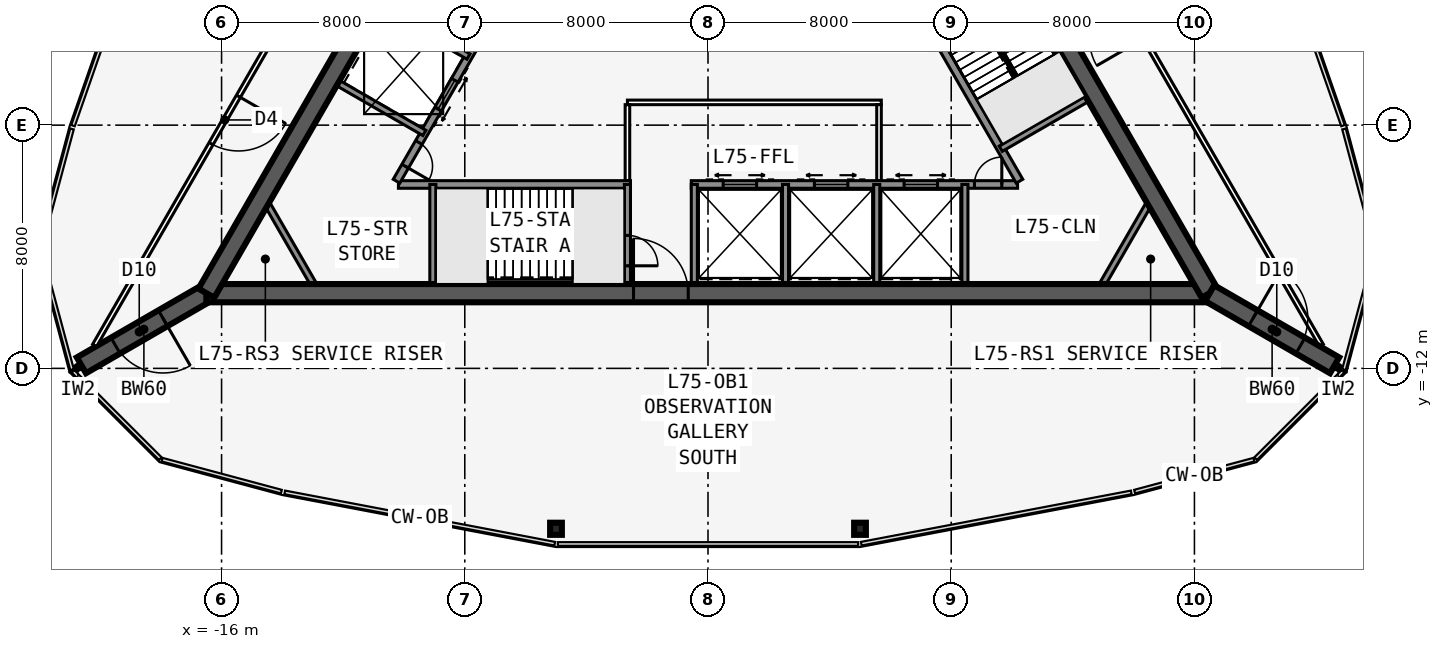
"""IFC4 building model, lengths in metres.
Left out: names, types, materials, properties, quantities, classifications, styles, units other than length and angle.
Written with IfcOpenShell. Run it as: python <this file> out.ifc"""

import sys

from ifc_helpers import new_model, si_unit, direction, frame, frame_2d, origin, origin_2d, place, context, subcontext, project, spatial, rectangle, i_section, extrude, element, fill, save


model = new_model("IFC4")
c1 = context("Model", 3, precision=1e-05, world=origin(), true_north=direction((0.0, 1.0)))
c2 = subcontext(c1, "Body", "Model", "MODEL_VIEW")
j1 = project(units=[si_unit("LENGTHUNIT", "METRE"), si_unit("PLANEANGLEUNIT", "RADIAN")], contexts=[c1])
p1 = place(None, origin())
s1 = spatial("IfcSite", under=j1, at=p1, CompositionType="ELEMENT")
p2 = place(p1, origin())
s2 = spatial("IfcBuilding", under=s1, at=p2, CompositionType="ELEMENT")
p3 = place(p2, frame((0.0, 0.0, 286.8)))
s3 = spatial("IfcBuildingStorey", under=s2, at=p3, CompositionType="ELEMENT", Elevation=286.8)
p4 = place(p3, frame((-16.5, -9.526, 0.0), z_axis=(0.0, 0.0, 1.0), x_axis=(1.0, 0.0, 0.0)))
e1 = element("IfcWall", 1, at=p4, inside=s3, PredefinedType="SHEAR", context=c2, shape_type="SweptSolid", body=[
    extrude(rectangle(XDim=33.0, YDim=0.6, at=frame_2d((16.5, 0.0))), origin(), (0.0, 0.0, 1.0), 6.0),
])
p5 = place(p4, frame((14.05, 0.0, 0.0)))
e2 = element("IfcOpeningElement", 2, at=p5, cuts=e1, PredefinedType="OPENING", context=c2, shape_type="SweptSolid", body=[
    extrude(rectangle(XDim=1.8, YDim=2.13, at=frame_2d((0.9, 1.065))), frame((0.0, 0.31, 0.0), z_axis=(0.0, -1.0, 0.0), x_axis=(1.0, 0.0, 0.0)), (0.0, 0.0, 1.0), 0.62),
])
p6 = place(p3, frame((-10.183, -5.951, 0.0), z_axis=(0.0, 0.0, 1.0), x_axis=(1.0, 0.0, 0.0)))
e3 = element("IfcWall", 3, at=p6, inside=s3, PredefinedType="SOLIDWALL", context=c2, shape_type="SweptSolid", body=[
    extrude(rectangle(XDim=7.633, YDim=0.25, at=frame_2d((3.816, 0.0))), origin(), (0.0, 0.0, 1.0), 5.75),
])
p7 = place(p3, frame((-0.55, -5.951, 0.0), z_axis=(0.0, 0.0, 1.0), x_axis=(1.0, 0.0, 0.0)))
e4 = element("IfcWall", 4, at=p7, inside=s3, PredefinedType="SOLIDWALL", context=c2, shape_type="SweptSolid", body=[
    extrude(rectangle(XDim=10.733, YDim=0.25, at=frame_2d((5.366, 0.0))), origin(), (0.0, 0.0, 1.0), 5.75),
])
p8 = place(p7, frame((9.314, 0.0, 0.0)))
e5 = element("IfcOpeningElement", 5, at=p8, cuts=e4, PredefinedType="OPENING", context=c2, shape_type="SweptSolid", body=[
    extrude(rectangle(XDim=0.9, YDim=2.13, at=frame_2d((0.45, 1.065))), frame((0.0, 0.135, 0.0), z_axis=(0.0, -1.0, 0.0), x_axis=(1.0, 0.0, 0.0)), (0.0, 0.0, 1.0), 0.27),
])
p9 = place(p7, frame((1.05, 0.0, 0.0)))
e6 = element("IfcOpeningElement", 6, at=p9, cuts=e4, PredefinedType="OPENING", context=c2, shape_type="SweptSolid", body=[
    extrude(rectangle(XDim=1.1, YDim=2.13, at=frame_2d((0.55, 1.065))), frame((0.0, 0.135, 0.0), z_axis=(0.0, -1.0, 0.0), x_axis=(1.0, 0.0, 0.0)), (0.0, 0.0, 1.0), 0.27),
])
p10 = place(p7, frame((4.05, 0.0, 0.0)))
e7 = element("IfcOpeningElement", 7, at=p10, cuts=e4, PredefinedType="OPENING", context=c2, shape_type="SweptSolid", body=[
    extrude(rectangle(XDim=1.1, YDim=2.13, at=frame_2d((0.55, 1.065))), frame((0.0, 0.135, 0.0), z_axis=(0.0, -1.0, 0.0), x_axis=(1.0, 0.0, 0.0)), (0.0, 0.0, 1.0), 0.27),
])
p11 = place(p7, frame((7.0, 0.0, 0.0)))
e8 = element("IfcOpeningElement", 8, at=p11, cuts=e4, PredefinedType="OPENING", context=c2, shape_type="SweptSolid", body=[
    extrude(rectangle(XDim=1.1, YDim=2.13, at=frame_2d((0.55, 1.065))), frame((0.0, 0.135, 0.0), z_axis=(0.0, -1.0, 0.0), x_axis=(1.0, 0.0, 0.0)), (0.0, 0.0, 1.0), 0.27),
])
p12 = place(p3, frame((-9.05, -5.951, 0.0), z_axis=(0.0, 0.0, 1.0), x_axis=(0.0, -1.0, 0.0)))
e9 = element("IfcWall", 9, at=p12, inside=s3, PredefinedType="SOLIDWALL", context=c2, shape_type="SweptSolid", body=[
    extrude(rectangle(XDim=3.275, YDim=0.2, at=frame_2d((1.637, 0.0))), origin(), (0.0, 0.0, 1.0), 5.75),
])
p13 = place(p3, frame((-2.65, -5.951, 0.0), z_axis=(0.0, 0.0, 1.0), x_axis=(0.0, -1.0, 0.0)))
e10 = element("IfcWall", 10, at=p13, inside=s3, PredefinedType="SOLIDWALL", context=c2, shape_type="SweptSolid", body=[
    extrude(rectangle(XDim=3.275, YDim=0.2, at=frame_2d((1.637, 0.0))), origin(), (0.0, 0.0, 1.0), 5.75),
])
p14 = place(p13, frame((1.675, 0.0, 0.0)))
e11 = element("IfcOpeningElement", 11, at=p14, cuts=e10, PredefinedType="OPENING", context=c2, shape_type="SweptSolid", body=[
    extrude(rectangle(XDim=1.0, YDim=2.13, at=frame_2d((0.5, 1.065))), frame((0.0, 0.11, 0.0), z_axis=(0.0, -1.0, 0.0), x_axis=(1.0, 0.0, 0.0)), (0.0, 0.0, 1.0), 0.22),
])
for number, where, z_axis, x_axis in (
    (12, (-0.45, -5.951, 0.0), (0.0, 0.0, 1.0), (0.0, -1.0, 0.0)),
    (13, (2.55, -5.951, 0.0), (0.0, 0.0, 1.0), (0.0, -1.0, 0.0)),
    (14, (5.55, -5.951, 0.0), (0.0, 0.0, 1.0), (0.0, -1.0, 0.0)),
    (15, (8.45, -5.951, 0.0), (0.0, 0.0, 1.0), (0.0, -1.0, 0.0)),
):
    element("IfcWall", number, at=place(p3, frame(where, z_axis=z_axis, x_axis=x_axis)), inside=s3, PredefinedType="SOLIDWALL", context=c2, shape_type="SweptSolid", body=[
        extrude(rectangle(XDim=3.275, YDim=0.2, at=frame_2d((1.637, 0.0))), origin(), (0.0, 0.0, 1.0), 5.75),
    ])
p15 = place(p3, frame((16.5, -9.526, 0.0), z_axis=(0.0, 0.0, 1.0), x_axis=(-0.499999749417, 0.866025548458, 0.0)))
e16 = element("IfcWall", 16, at=p15, inside=s3, PredefinedType="SHEAR", context=c2, shape_type="SweptSolid", body=[
    extrude(rectangle(XDim=33.0, YDim=0.6, at=frame_2d((16.5, 0.0))), origin(), (0.0, 0.0, 1.0), 6.0),
])
p16 = place(p15, frame((14.15, 0.0, 0.0)))
e17 = element("IfcOpeningElement", 17, at=p16, cuts=e16, PredefinedType="OPENING", context=c2, shape_type="SweptSolid", body=[
    extrude(rectangle(XDim=1.8, YDim=2.13, at=frame_2d((0.9, 1.065))), frame((0.0, 0.31, 0.0), z_axis=(0.0, -1.0, 0.0), x_axis=(1.0, 0.0, 0.0)), (0.0, 0.0, 1.0), 0.62),
])
p17 = place(p15, frame((12.6, 0.0, 0.0)))
e18 = element("IfcOpeningElement", 18, at=p17, cuts=e16, PredefinedType="OPENING", context=c2, shape_type="SweptSolid", body=[
    extrude(rectangle(XDim=1.0, YDim=2.13, at=frame_2d((0.5, 1.065))), frame((0.0, 0.31, 0.0), z_axis=(0.0, -1.0, 0.0), x_axis=(1.0, 0.0, 0.0)), (0.0, 0.0, 1.0), 0.62),
])
p18 = place(p3, frame((10.245, -5.843, 0.0), z_axis=(0.0, 0.0, 1.0), x_axis=(-0.499993009313, 0.866029439822, 0.0)))
e19 = element("IfcWall", 19, at=p18, inside=s3, PredefinedType="SOLIDWALL", context=c2, shape_type="SweptSolid", body=[
    extrude(rectangle(XDim=7.733, YDim=0.25, at=frame_2d((3.866, 0.0))), origin(), (0.0, 0.0, 1.0), 5.75),
])
p19 = place(p3, frame((9.629, -4.775, 0.0), z_axis=(0.0, 0.0, 1.0), x_axis=(0.865995643347, 0.500051543047, 0.0)))
e20 = element("IfcWall", 20, at=p19, inside=s3, PredefinedType="SOLIDWALL", context=c2, shape_type="SweptSolid", body=[
    extrude(rectangle(XDim=3.275, YDim=0.2, at=frame_2d((1.638, 0.0))), origin(), (0.0, 0.0, 1.0), 5.75),
])
p20 = place(p3, frame((0.0, 19.052, 0.0), z_axis=(0.0, 0.0, 1.0), x_axis=(-0.499999749417, -0.866025548458, 0.0)))
e21 = element("IfcWall", 21, at=p20, inside=s3, PredefinedType="SHEAR", context=c2, shape_type="SweptSolid", body=[
    extrude(rectangle(XDim=33.0, YDim=0.6, at=frame_2d((16.5, 0.0))), origin(), (0.0, 0.0, 1.0), 6.0),
])
p21 = place(p20, frame((14.15, 0.0, 0.0)))
e22 = element("IfcOpeningElement", 22, at=p21, cuts=e21, PredefinedType="OPENING", context=c2, shape_type="SweptSolid", body=[
    extrude(rectangle(XDim=1.8, YDim=2.13, at=frame_2d((0.9, 1.065))), frame((0.0, 0.31, 0.0), z_axis=(0.0, -1.0, 0.0), x_axis=(1.0, 0.0, 0.0)), (0.0, 0.0, 1.0), 0.62),
])
p22 = place(p20, frame((12.6, 0.0, 0.0)))
e23 = element("IfcOpeningElement", 23, at=p22, cuts=e21, PredefinedType="OPENING", context=c2, shape_type="SweptSolid", body=[
    extrude(rectangle(XDim=1.0, YDim=2.13, at=frame_2d((0.5, 1.065))), frame((0.0, 0.31, 0.0), z_axis=(0.0, -1.0, 0.0), x_axis=(1.0, 0.0, 0.0)), (0.0, 0.0, 1.0), 0.62),
])
p23 = place(p3, frame((-4.929, 3.365, 0.0), z_axis=(0.0, 0.0, 1.0), x_axis=(-0.499991433582, -0.866030349552, 0.0)))
e24 = element("IfcWall", 24, at=p23, inside=s3, PredefinedType="SOLIDWALL", context=c2, shape_type="SweptSolid", body=[
    extrude(rectangle(XDim=10.633, YDim=0.25, at=frame_2d((5.316, 0.0))), origin(), (0.0, 0.0, 1.0), 5.75),
])
p24 = place(p23, frame((9.164, 0.0, 0.0)))
e25 = element("IfcOpeningElement", 25, at=p24, cuts=e24, PredefinedType="OPENING", context=c2, shape_type="SweptSolid", body=[
    extrude(rectangle(XDim=0.9, YDim=2.13, at=frame_2d((0.45, 1.065))), frame((0.0, 0.135, 0.0), z_axis=(0.0, -1.0, 0.0), x_axis=(1.0, 0.0, 0.0)), (0.0, 0.0, 1.0), 0.27),
])
p25 = place(p23, frame((1.1, 0.0, 0.0)))
e26 = element("IfcOpeningElement", 26, at=p25, cuts=e24, PredefinedType="OPENING", context=c2, shape_type="SweptSolid", body=[
    extrude(rectangle(XDim=0.9, YDim=2.13, at=frame_2d((0.45, 1.065))), frame((0.0, 0.135, 0.0), z_axis=(0.0, -1.0, 0.0), x_axis=(1.0, 0.0, 0.0)), (0.0, 0.0, 1.0), 0.27),
])
p26 = place(p23, frame((4.0, 0.0, 0.0)))
e27 = element("IfcOpeningElement", 27, at=p26, cuts=e24, PredefinedType="OPENING", context=c2, shape_type="SweptSolid", body=[
    extrude(rectangle(XDim=0.9, YDim=2.13, at=frame_2d((0.45, 1.065))), frame((0.0, 0.135, 0.0), z_axis=(0.0, -1.0, 0.0), x_axis=(1.0, 0.0, 0.0)), (0.0, 0.0, 1.0), 0.27),
])
p27 = place(p23, frame((6.8, 0.0, 0.0)))
e28 = element("IfcOpeningElement", 28, at=p27, cuts=e24, PredefinedType="OPENING", context=c2, shape_type="SweptSolid", body=[
    extrude(rectangle(XDim=1.1, YDim=2.13, at=frame_2d((0.55, 1.065))), frame((0.0, 0.135, 0.0), z_axis=(0.0, -1.0, 0.0), x_axis=(1.0, 0.0, 0.0)), (0.0, 0.0, 1.0), 0.27),
])
for number, where, z_axis, x_axis in (
    (29, (-7.879, -1.744, 0.0), (0.0, 0.0, 1.0), (-0.866, 0.5, 0.0)),
    (30, (-9.329, -4.256, 0.0), (0.0, 0.0, 1.0), (-0.866, 0.5, 0.0)),
):
    element("IfcWall", number, at=place(p3, frame(where, z_axis=z_axis, x_axis=x_axis)), inside=s3, PredefinedType="SOLIDWALL", context=c2, shape_type="SweptSolid", body=[
        extrude(rectangle(XDim=3.275, YDim=0.2, at=frame_2d((1.637, 0.0))), origin(), (0.0, 0.0, 1.0), 5.75),
    ])
p28 = place(p3, frame((16.5, -9.526, 0.0), z_axis=(0.0, 0.0, 1.0), x_axis=(0.866031398331, -0.499989616998, 0.0)))
e31 = element("IfcWall", 31, at=p28, inside=s3, PredefinedType="SHEAR", context=c2, shape_type="SweptSolid", body=[
    extrude(rectangle(XDim=4.746, YDim=0.6, at=frame_2d((2.373, 0.0))), origin(), (0.0, 0.0, 1.0), 6.0),
])
p29 = place(p28, frame((1.65, 0.0, 0.0)))
e32 = element("IfcOpeningElement", 32, at=p29, cuts=e31, PredefinedType="OPENING", context=c2, shape_type="SweptSolid", body=[
    extrude(rectangle(XDim=1.8, YDim=2.13, at=frame_2d((0.9, 1.065))), frame((0.0, 0.31, 0.0), z_axis=(0.0, -1.0, 0.0), x_axis=(1.0, 0.0, 0.0)), (0.0, 0.0, 1.0), 0.62),
])
p30 = place(p3, frame((-16.5, -9.526, 0.0), z_axis=(0.0, 0.0, 1.0), x_axis=(-0.866031398331, -0.499989616998, 0.0)))
e33 = element("IfcWall", 33, at=p30, inside=s3, PredefinedType="SHEAR", context=c2, shape_type="SweptSolid", body=[
    extrude(rectangle(XDim=4.746, YDim=0.6, at=frame_2d((2.373, 0.0))), origin(), (0.0, 0.0, 1.0), 6.0),
])
p31 = place(p30, frame((1.65, 0.0, 0.0)))
e34 = element("IfcOpeningElement", 34, at=p31, cuts=e33, PredefinedType="OPENING", context=c2, shape_type="SweptSolid", body=[
    extrude(rectangle(XDim=1.8, YDim=2.13, at=frame_2d((0.9, 1.065))), frame((0.0, 0.31, 0.0), z_axis=(0.0, -1.0, 0.0), x_axis=(1.0, 0.0, 0.0)), (0.0, 0.0, 1.0), 0.62),
])
for number, where, z_axis, x_axis in (
    (35, (-5.0, -17.276, 0.0), (0.0, 0.0, 1.0), (0.0, -1.0, 0.0)),
    (36, (5.0, -17.276, 0.0), (0.0, 0.0, 1.0), (0.0, -1.0, 0.0)),
):
    element("IfcColumn", number, at=place(p3, frame(where, z_axis=z_axis, x_axis=x_axis)), inside=s3, PredefinedType="COLUMN", context=c2, shape_type="SweptSolid", body=[
        extrude(i_section(OverallWidth=0.399, OverallDepth=0.386, WebThickness=0.021, FlangeThickness=0.033, at=origin_2d()), origin(), (0.0, 0.0, 1.0), 6.0),
    ])
p32 = place(p3, frame((20.177, -11.245, 0.0), z_axis=(0.0, 0.0, 1.0), x_axis=(-0.499998875317, 0.866026053119, 0.0)))
e37 = element("IfcWall", 37, at=p32, inside=s3, PredefinedType="PARTITIONING", context=c2, shape_type="SweptSolid", body=[
    extrude(rectangle(XDim=39.654, YDim=0.15, at=frame_2d((19.827, 0.0))), origin(), (0.0, 0.0, 1.0), 5.75),
])
p33 = place(p32, frame((11.664, 0.0, 0.0)))
e38 = element("IfcOpeningElement", 38, at=p33, cuts=e37, PredefinedType="OPENING", context=c2, shape_type="SweptSolid", body=[
    extrude(rectangle(XDim=1.8, YDim=2.13, at=frame_2d((0.9, 1.065))), frame((0.0, 0.085, 0.0), z_axis=(0.0, -1.0, 0.0), x_axis=(1.0, 0.0, 0.0)), (0.0, 0.0, 1.0), 0.17),
])
p34 = place(p32, frame((31.591, 0.0, 0.0)))
e39 = element("IfcOpeningElement", 39, at=p34, cuts=e37, PredefinedType="OPENING", context=c2, shape_type="SweptSolid", body=[
    extrude(rectangle(XDim=1.0, YDim=2.13, at=frame_2d((0.5, 1.065))), frame((0.0, 0.085, 0.0), z_axis=(0.0, -1.0, 0.0), x_axis=(1.0, 0.0, 0.0)), (0.0, 0.0, 1.0), 0.17),
])
p35 = place(p3, frame((-0.35, 23.096, 0.0), z_axis=(0.0, 0.0, 1.0), x_axis=(-0.499998875317, -0.866026053119, 0.0)))
e40 = element("IfcWall", 40, at=p35, inside=s3, PredefinedType="PARTITIONING", context=c2, shape_type="SweptSolid", body=[
    extrude(rectangle(XDim=39.654, YDim=0.15, at=frame_2d((19.827, 0.0))), origin(), (0.0, 0.0, 1.0), 5.75),
])
p36 = place(p35, frame((8.063, 0.0, 0.0)))
e41 = element("IfcOpeningElement", 41, at=p36, cuts=e40, PredefinedType="OPENING", context=c2, shape_type="SweptSolid", body=[
    extrude(rectangle(XDim=1.0, YDim=2.13, at=frame_2d((0.5, 1.065))), frame((0.0, 0.085, 0.0), z_axis=(0.0, -1.0, 0.0), x_axis=(1.0, 0.0, 0.0)), (0.0, 0.0, 1.0), 0.17),
])
p37 = place(p35, frame((17.827, 0.0, 0.0)))
e42 = element("IfcOpeningElement", 42, at=p37, cuts=e40, PredefinedType="OPENING", context=c2, shape_type="SweptSolid", body=[
    extrude(rectangle(XDim=1.0, YDim=2.13, at=frame_2d((0.5, 1.065))), frame((0.0, 0.085, 0.0), z_axis=(0.0, -1.0, 0.0), x_axis=(1.0, 0.0, 0.0)), (0.0, 0.0, 1.0), 0.17),
])
p38 = place(p35, frame((20.827, 0.0, 0.0)))
e43 = element("IfcOpeningElement", 43, at=p38, cuts=e40, PredefinedType="OPENING", context=c2, shape_type="SweptSolid", body=[
    extrude(rectangle(XDim=1.0, YDim=2.13, at=frame_2d((0.5, 1.065))), frame((0.0, 0.085, 0.0), z_axis=(0.0, -1.0, 0.0), x_axis=(1.0, 0.0, 0.0)), (0.0, 0.0, 1.0), 0.17),
])
p39 = place(p35, frame((30.19, 0.0, 0.0)))
e44 = element("IfcOpeningElement", 44, at=p39, cuts=e40, PredefinedType="OPENING", context=c2, shape_type="SweptSolid", body=[
    extrude(rectangle(XDim=1.8, YDim=2.13, at=frame_2d((0.9, 1.065))), frame((0.0, 0.085, 0.0), z_axis=(0.0, -1.0, 0.0), x_axis=(1.0, 0.0, 0.0)), (0.0, 0.0, 1.0), 0.17),
])
for number, where, z_axis, x_axis in (
    (45, (20.61, -11.899, 0.0), (0.0, 0.0, 1.0), (0.866, -0.5, 0.0)),
    (46, (-20.61, -11.899, 0.0), (0.0, 0.0, 1.0), (-0.866, -0.5, 0.0)),
):
    element("IfcWall", number, at=place(p3, frame(where, z_axis=z_axis, x_axis=x_axis)), inside=s3, PredefinedType="PARTITIONING", context=c2, shape_type="SweptSolid", body=[
        extrude(rectangle(XDim=0.27, YDim=0.15, at=frame_2d((0.135, 0.0))), origin(), (0.0, 0.0, 1.0), 5.75),
    ])
p40 = place(p3, frame((-2.65, -3.251, 0.0), z_axis=(0.0, 0.0, 1.0), x_axis=(1.0, 0.0, 0.0)))
e47 = element("IfcWall", 47, at=p40, inside=s3, PredefinedType="PARTITIONING", context=c2, shape_type="SweptSolid", body=[
    extrude(rectangle(XDim=8.35, YDim=0.15, at=frame_2d((4.175, 0.0))), origin(), (0.0, 0.0, 1.0), 5.75),
])
for number, where, z_axis, x_axis in (
    (48, (-2.65, -5.826, 0.0), (0.0, 0.0, 1.0), (0.0, 1.0, 0.0)),
    (49, (5.625, -5.826, 0.0), (0.0, 0.0, 1.0), (0.0, 1.0, 0.0)),
):
    element("IfcWall", number, at=place(p3, frame(where, z_axis=z_axis, x_axis=x_axis)), inside=s3, PredefinedType="PARTITIONING", context=c2, shape_type="SweptSolid", body=[
        extrude(rectangle(XDim=2.5, YDim=0.15, at=frame_2d((1.25, 0.0))), origin(), (0.0, 0.0, 1.0), 5.75),
    ])
for number, where, z_axis, x_axis in (
    (50, (14.479, -6.626, 0.0), (0.0, 0.0, 1.0), (-0.5, -0.866, 0.0)),
    (51, (-12.978, -9.226, 0.0), (0.0, 0.0, 1.0), (-0.5, 0.866, 0.0)),
):
    element("IfcWall", number, at=place(p3, frame(where, z_axis=z_axis, x_axis=x_axis)), inside=s3, PredefinedType="SOLIDWALL", context=c2, shape_type="SweptSolid", body=[
        extrude(rectangle(XDim=3.002, YDim=0.2, at=frame_2d((1.501, 0.0))), origin(), (0.0, 0.0, 1.0), 5.75),
    ])
p41 = place(p3, frame((-7.247, -7.576, 0.0), z_axis=(0.0, 0.0, 1.0), x_axis=(1.0, 0.0, 0.0)))
e52 = element("IfcWall", 52, at=p41, inside=s3, PredefinedType="SOLIDWALL", context=c2, shape_type="SweptSolid", body=[
    extrude(rectangle(XDim=2.794, YDim=0.1, at=frame_2d((1.397, 0.0))), origin(), (0.0, 0.0, 1.0), 6.0),
])
p42 = place(p3, frame((10.135, -2.401, 0.0), z_axis=(0.0, 0.0, 1.0), x_axis=(-0.499992232847, 0.866029888106, 0.0)))
e53 = element("IfcWall", 53, at=p42, inside=s3, PredefinedType="SOLIDWALL", context=c2, shape_type="SweptSolid", body=[
    extrude(rectangle(XDim=2.794, YDim=0.1, at=frame_2d((1.397, 0.0))), origin(), (0.0, 0.0, 1.0), 6.0),
])
p43 = place(p39, origin())
e54 = element("IfcDoor", 54, at=p43, inside=s3, OperationType="DOUBLE_DOOR_SINGLE_SWING", PredefinedType="DOOR", context=c2, shape_type="SweptSolid", body=[
    extrude(rectangle(XDim=1.8, YDim=2.13, at=frame_2d((0.9, 1.065))), frame((0.0, 0.025, 0.0), z_axis=(0.0, -1.0, 0.0), x_axis=(1.0, 0.0, 0.0)), (0.0, 0.0, 1.0), 0.05),
])
fill(e44, e54)
p44 = place(p5, origin())
e55 = element("IfcDoor", 55, at=p44, inside=s3, OperationType="DOUBLE_DOOR_SINGLE_SWING", PredefinedType="DOOR", context=c2, shape_type="SweptSolid", body=[
    extrude(rectangle(XDim=1.8, YDim=2.13, at=frame_2d((0.9, 1.065))), frame((0.0, 0.025, 0.0), z_axis=(0.0, -1.0, 0.0), x_axis=(1.0, 0.0, 0.0)), (0.0, 0.0, 1.0), 0.05),
])
fill(e2, e55)
p45 = place(p14, origin())
e56 = element("IfcDoor", 56, at=p45, inside=s3, OperationType="SINGLE_SWING_RIGHT", PredefinedType="DOOR", context=c2, shape_type="SweptSolid", body=[
    extrude(rectangle(XDim=1.0, YDim=2.13, at=frame_2d((0.5, 1.065))), frame((0.0, 0.025, 0.0), z_axis=(0.0, -1.0, 0.0), x_axis=(1.0, 0.0, 0.0)), (0.0, 0.0, 1.0), 0.05),
])
fill(e11, e56)
p46 = place(p29, origin())
e57 = element("IfcDoor", 57, at=p46, inside=s3, OperationType="DOUBLE_DOOR_DOUBLE_SWING", PredefinedType="DOOR", context=c2, shape_type="SweptSolid", body=[
    extrude(rectangle(XDim=1.8, YDim=2.13, at=frame_2d((0.9, 1.065))), frame((0.0, 0.025, 0.0), z_axis=(0.0, -1.0, 0.0), x_axis=(1.0, 0.0, 0.0)), (0.0, 0.0, 1.0), 0.05),
])
fill(e32, e57)
p47 = place(p31, origin())
e58 = element("IfcDoor", 58, at=p47, inside=s3, OperationType="DOUBLE_DOOR_DOUBLE_SWING", PredefinedType="DOOR", context=c2, shape_type="SweptSolid", body=[
    extrude(rectangle(XDim=1.8, YDim=2.13, at=frame_2d((0.9, 1.065))), frame((0.0, 0.025, 0.0), z_axis=(0.0, -1.0, 0.0), x_axis=(1.0, 0.0, 0.0)), (0.0, 0.0, 1.0), 0.05),
])
fill(e34, e58)
p48 = place(p8, origin())
e59 = element("IfcDoor", 59, at=p48, inside=s3, OperationType="SINGLE_SWING_RIGHT", PredefinedType="DOOR", context=c2, shape_type="SweptSolid", body=[
    extrude(rectangle(XDim=0.9, YDim=2.13, at=frame_2d((0.45, 1.065))), frame((0.0, 0.025, 0.0), z_axis=(0.0, -1.0, 0.0), x_axis=(1.0, 0.0, 0.0)), (0.0, 0.0, 1.0), 0.05),
])
fill(e5, e59)
p49 = place(p24, origin())
e60 = element("IfcDoor", 60, at=p49, inside=s3, OperationType="SINGLE_SWING_RIGHT", PredefinedType="DOOR", context=c2, shape_type="SweptSolid", body=[
    extrude(rectangle(XDim=0.9, YDim=2.13, at=frame_2d((0.45, 1.065))), frame((0.0, 0.025, 0.0), z_axis=(0.0, -1.0, 0.0), x_axis=(1.0, 0.0, 0.0)), (0.0, 0.0, 1.0), 0.05),
])
fill(e25, e60)
p50 = place(p9, origin())
e61 = element("IfcDoor", 61, at=p50, inside=s3, OperationType="DOUBLE_DOOR_SLIDING", PredefinedType="USERDEFINED", context=c2, shape_type="SweptSolid", body=[
    extrude(rectangle(XDim=1.1, YDim=2.13, at=frame_2d((0.55, 1.065))), frame((0.0, 0.025, 0.0), z_axis=(0.0, -1.0, 0.0), x_axis=(1.0, 0.0, 0.0)), (0.0, 0.0, 1.0), 0.05),
])
fill(e6, e61)
p51 = place(p10, origin())
e62 = element("IfcDoor", 62, at=p51, inside=s3, OperationType="DOUBLE_DOOR_SLIDING", PredefinedType="USERDEFINED", context=c2, shape_type="SweptSolid", body=[
    extrude(rectangle(XDim=1.1, YDim=2.13, at=frame_2d((0.55, 1.065))), frame((0.0, 0.025, 0.0), z_axis=(0.0, -1.0, 0.0), x_axis=(1.0, 0.0, 0.0)), (0.0, 0.0, 1.0), 0.05),
])
fill(e7, e62)
p52 = place(p11, origin())
e63 = element("IfcDoor", 63, at=p52, inside=s3, OperationType="DOUBLE_DOOR_SLIDING", PredefinedType="USERDEFINED", context=c2, shape_type="SweptSolid", body=[
    extrude(rectangle(XDim=1.1, YDim=2.13, at=frame_2d((0.55, 1.065))), frame((0.0, 0.025, 0.0), z_axis=(0.0, -1.0, 0.0), x_axis=(1.0, 0.0, 0.0)), (0.0, 0.0, 1.0), 0.05),
])
fill(e8, e63)
p53 = place(p27, origin())
e64 = element("IfcDoor", 64, at=p53, inside=s3, OperationType="DOUBLE_DOOR_SLIDING", PredefinedType="USERDEFINED", context=c2, shape_type="SweptSolid", body=[
    extrude(rectangle(XDim=1.1, YDim=2.13, at=frame_2d((0.55, 1.065))), frame((0.0, 0.025, 0.0), z_axis=(0.0, -1.0, 0.0), x_axis=(1.0, 0.0, 0.0)), (0.0, 0.0, 1.0), 0.05),
])
fill(e28, e64)
save(model, sys.argv[1])
